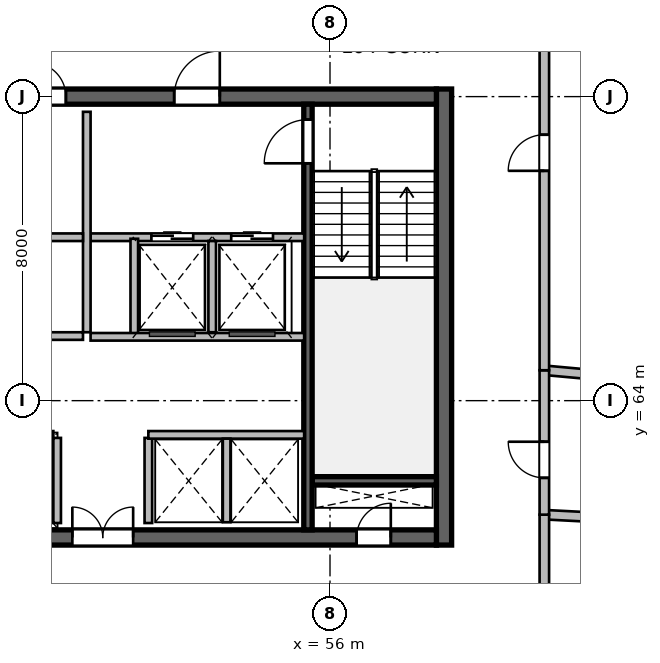
"""IFC4 building model, lengths in metres.
Left out: names, types, materials, properties, quantities, classifications, styles, units other than length and angle.
Written with IfcOpenShell. Run it as: python <this file> out.ifc"""

import sys

from ifc_helpers import new_model, si_unit, direction, frame, frame_2d, origin, place, context, subcontext, project, spatial, rectangle, extrude, source, transform, mapped, element, fill, save


model = new_model("IFC4")
c1 = context("Model", 3, precision=1e-05, world=origin(), true_north=direction((0.0, 1.0)))
c2 = subcontext(c1, "Body", "Model", "MODEL_VIEW")
j1 = project(units=[si_unit("LENGTHUNIT", "METRE"), si_unit("PLANEANGLEUNIT", "RADIAN")], contexts=[c1])
p1 = place(None, origin())
s1 = spatial("IfcSite", under=j1, at=p1, CompositionType="ELEMENT")
p2 = place(p1, origin())
s2 = spatial("IfcBuilding", under=s1, at=p2, CompositionType="ELEMENT")
p3 = place(p2, frame((0.0, 0.0, 264.0)))
s3 = spatial("IfcBuildingStorey", under=s2, at=p3, CompositionType="ELEMENT", Elevation=264.0)
m1 = source(origin(), c2, "Body", "SweptSolid", [
    extrude(rectangle(XDim=12.0, YDim=0.4, at=frame_2d((6.0, 0.0))), origin(), (0.0, 0.0, 1.0), 3.9),
])
p4 = place(p3, frame((59.0, 60.2, 0.0), z_axis=(0.0, 0.0, 1.0), x_axis=(0.0, 1.0, 0.0)))
e1 = element("IfcWall", 1, at=p4, inside=s3, PredefinedType="SHEAR", context=c2, shape_type="MappedRepresentation", body=[
    mapped(m1, transform((0.0, 0.0, 0.0), scale=1.0)),
])
m2 = source(origin(), c2, "Body", "SweptSolid", [
    extrude(rectangle(XDim=21.6, YDim=0.4, at=frame_2d((10.8, 0.0))), origin(), (0.0, 0.0, 1.0), 3.9),
])
p5 = place(p3, frame((37.2, 60.4, 0.0), z_axis=(0.0, 0.0, 1.0), x_axis=(1.0, 0.0, 0.0)))
e2 = element("IfcWall", 2, at=p5, inside=s3, PredefinedType="SHEAR", context=c2, shape_type="MappedRepresentation", body=[
    mapped(m2, transform((0.0, 0.0, 0.0), scale=1.0)),
])
p6 = place(p5, frame((1.1, 0.0, 0.0)))
e3 = element("IfcOpeningElement", 3, at=p6, cuts=e2, PredefinedType="OPENING", context=c2, shape_type="SweptSolid", body=[
    extrude(rectangle(XDim=1.15, YDim=2.15, at=frame_2d((0.575, 1.075))), frame((0.0, 0.21, 0.0), z_axis=(0.0, -1.0, 0.0), x_axis=(1.0, 0.0, 0.0)), (0.0, 0.0, 1.0), 0.42),
])
p7 = place(p5, frame((19.5, 0.0, 0.0)))
e4 = element("IfcOpeningElement", 4, at=p7, cuts=e2, PredefinedType="OPENING", context=c2, shape_type="SweptSolid", body=[
    extrude(rectangle(XDim=0.9, YDim=2.1, at=frame_2d((0.45, 1.05))), frame((0.0, 0.21, 0.0), z_axis=(0.0, -1.0, 0.0), x_axis=(1.0, 0.0, 0.0)), (0.0, 0.0, 1.0), 0.42),
])
p8 = place(p5, frame((12.02, 0.0, 0.0)))
e5 = element("IfcOpeningElement", 5, at=p8, cuts=e2, PredefinedType="OPENING", context=c2, shape_type="SweptSolid", body=[
    extrude(rectangle(XDim=1.6, YDim=2.15, at=frame_2d((0.8, 1.075))), frame((0.0, 0.21, 0.0), z_axis=(0.0, -1.0, 0.0), x_axis=(1.0, 0.0, 0.0)), (0.0, 0.0, 1.0), 0.42),
])
p9 = place(p3, frame((37.2, 72.0, 0.0), z_axis=(0.0, 0.0, 1.0), x_axis=(1.0, 0.0, 0.0)))
e6 = element("IfcWall", 6, at=p9, inside=s3, PredefinedType="SHEAR", context=c2, shape_type="MappedRepresentation", body=[
    mapped(m2, transform((0.0, 0.0, 0.0), scale=1.0)),
])
p10 = place(p9, frame((1.2, 0.0, 0.0)))
e7 = element("IfcOpeningElement", 7, at=p10, cuts=e6, PredefinedType="OPENING", context=c2, shape_type="SweptSolid", body=[
    extrude(rectangle(XDim=0.9, YDim=2.1, at=frame_2d((0.45, 1.05))), frame((0.0, 0.21, 0.0), z_axis=(0.0, -1.0, 0.0), x_axis=(1.0, 0.0, 0.0)), (0.0, 0.0, 1.0), 0.42),
])
p11 = place(p9, frame((14.7, 0.0, 0.0)))
e8 = element("IfcOpeningElement", 8, at=p11, cuts=e6, PredefinedType="OPENING", context=c2, shape_type="SweptSolid", body=[
    extrude(rectangle(XDim=1.2, YDim=2.15, at=frame_2d((0.6, 1.075))), frame((0.0, 0.21, 0.0), z_axis=(0.0, -1.0, 0.0), x_axis=(1.0, 0.0, 0.0)), (0.0, 0.0, 1.0), 0.42),
])
p12 = place(p9, frame((4.15, 0.0, 0.0)))
e9 = element("IfcOpeningElement", 9, at=p12, cuts=e6, PredefinedType="OPENING", context=c2, shape_type="SweptSolid", body=[
    extrude(rectangle(XDim=1.3, YDim=2.15, at=frame_2d((0.65, 1.075))), frame((0.0, 0.21, 0.0), z_axis=(0.0, -1.0, 0.0), x_axis=(1.0, 0.0, 0.0)), (0.0, 0.0, 1.0), 0.42),
])
p13 = place(p9, frame((7.25, 0.0, 0.0)))
e10 = element("IfcOpeningElement", 10, at=p13, cuts=e6, PredefinedType="OPENING", context=c2, shape_type="SweptSolid", body=[
    extrude(rectangle(XDim=0.9, YDim=2.1, at=frame_2d((0.45, 1.05))), frame((0.0, 0.21, 0.0), z_axis=(0.0, -1.0, 0.0), x_axis=(1.0, 0.0, 0.0)), (0.0, 0.0, 1.0), 0.42),
])
p14 = place(p9, frame((10.95, 0.0, 0.0)))
e11 = element("IfcOpeningElement", 11, at=p14, cuts=e6, PredefinedType="OPENING", context=c2, shape_type="SweptSolid", body=[
    extrude(rectangle(XDim=0.9, YDim=2.1, at=frame_2d((0.45, 1.05))), frame((0.0, 0.21, 0.0), z_axis=(0.0, -1.0, 0.0), x_axis=(1.0, 0.0, 0.0)), (0.0, 0.0, 1.0), 0.42),
])
m3 = source(origin(), c2, "Body", "SweptSolid", [
    extrude(rectangle(XDim=3.27, YDim=0.22, at=frame_2d((1.635, 0.0))), origin(), (0.0, 0.0, 1.0), 3.9),
])
p15 = place(p3, frame((55.53, 61.89, 0.0), z_axis=(0.0, 0.0, 1.0), x_axis=(1.0, 0.0, 0.0)))
e12 = element("IfcWall", 12, at=p15, inside=s3, PredefinedType="SHEAR", context=c2, shape_type="MappedRepresentation", body=[
    mapped(m3, transform((0.0, 0.0, 0.0), scale=1.0)),
])
m4 = source(origin(), c2, "Body", "SweptSolid", [
    extrude(rectangle(XDim=11.2, YDim=0.22, at=frame_2d((5.6, 0.0))), origin(), (0.0, 0.0, 1.0), 3.9),
])
p16 = place(p3, frame((55.42, 60.6, 0.0), z_axis=(0.0, 0.0, 1.0), x_axis=(0.0, 1.0, 0.0)))
e13 = element("IfcWall", 13, at=p16, inside=s3, PredefinedType="SHEAR", context=c2, shape_type="MappedRepresentation", body=[
    mapped(m4, transform((0.0, 0.0, 0.0), scale=1.0)),
])
p17 = place(p16, frame((9.645, 0.0, 0.0)))
e14 = element("IfcOpeningElement", 14, at=p17, cuts=e13, PredefinedType="OPENING", context=c2, shape_type="SweptSolid", body=[
    extrude(rectangle(XDim=1.15, YDim=2.15, at=frame_2d((0.575, 1.075))), frame((0.0, 0.12, 0.0), z_axis=(0.0, -1.0, 0.0), x_axis=(1.0, 0.0, 0.0)), (0.0, 0.0, 1.0), 0.24),
])
m5 = source(origin(), c2, "Body", "SweptSolid", [
    extrude(rectangle(XDim=2.24, YDim=0.2, at=frame_2d((1.12, 0.0))), origin(), (0.0, 0.0, 1.0), 3.65),
])
for number, where, z_axis, x_axis in (
    (15, (48.82, 60.78, 0.0), (0.0, 0.0, 1.0), (0.0, 1.0, 0.0)),
    (16, (51.22, 60.78, 0.0), (0.0, 0.0, 1.0), (0.0, 1.0, 0.0)),
):
    element("IfcWall", number, at=place(p3, frame(where, z_axis=z_axis, x_axis=x_axis)), inside=s3, PredefinedType="SOLIDWALL", context=c2, shape_type="MappedRepresentation", body=[
        mapped(m5, transform((0.0, 0.0, 0.0), scale=1.0)),
    ])
m6 = source(origin(), c2, "Body", "SweptSolid", [
    extrude(rectangle(XDim=5.62, YDim=0.2, at=frame_2d((2.81, 0.0))), origin(), (0.0, 0.0, 1.0), 3.65),
])
p18 = place(p3, frame((49.7, 68.3, 0.0), z_axis=(0.0, 0.0, 1.0), x_axis=(1.0, 0.0, 0.0)))
e17 = element("IfcWall", 17, at=p18, inside=s3, PredefinedType="SOLIDWALL", context=c2, shape_type="MappedRepresentation", body=[
    mapped(m6, transform((0.0, 0.0, 0.0), scale=1.0)),
])
p19 = place(p18, frame((1.6, 0.0, 0.0)))
e18 = element("IfcOpeningElement", 18, at=p19, cuts=e17, PredefinedType="OPENING", context=c2, shape_type="SweptSolid", body=[
    extrude(rectangle(XDim=1.1, YDim=2.15, at=frame_2d((0.55, 1.075))), frame((0.0, 0.11, 0.0), z_axis=(0.0, -1.0, 0.0), x_axis=(1.0, 0.0, 0.0)), (0.0, 0.0, 1.0), 0.22),
])
p20 = place(p18, frame((3.7, 0.0, 0.0)))
e19 = element("IfcOpeningElement", 19, at=p20, cuts=e17, PredefinedType="OPENING", context=c2, shape_type="SweptSolid", body=[
    extrude(rectangle(XDim=1.1, YDim=2.15, at=frame_2d((0.55, 1.075))), frame((0.0, 0.11, 0.0), z_axis=(0.0, -1.0, 0.0), x_axis=(1.0, 0.0, 0.0)), (0.0, 0.0, 1.0), 0.22),
])
m7 = source(origin(), c2, "Body", "SweptSolid", [
    extrude(rectangle(XDim=5.8, YDim=0.2, at=frame_2d((2.9, 0.0))), origin(), (0.0, 0.0, 1.0), 3.65),
])
p21 = place(p3, frame((49.6, 65.8, 0.0), z_axis=(0.0, 0.0, 1.0), x_axis=(0.0, 1.0, 0.0)))
e20 = element("IfcWall", 20, at=p21, inside=s3, PredefinedType="SOLIDWALL", context=c2, shape_type="MappedRepresentation", body=[
    mapped(m7, transform((0.0, 0.0, 0.0), scale=1.0)),
])
m8 = source(origin(), c2, "Body", "SweptSolid", [
    extrude(rectangle(XDim=2.58, YDim=0.2, at=frame_2d((1.29, 0.0))), origin(), (0.0, 0.0, 1.0), 3.65),
])
p22 = place(p3, frame((50.85, 65.68, 0.0), z_axis=(0.0, 0.0, 1.0), x_axis=(0.0, 1.0, 0.0)))
e21 = element("IfcWall", 21, at=p22, inside=s3, PredefinedType="SOLIDWALL", context=c2, shape_type="MappedRepresentation", body=[
    mapped(m8, transform((0.0, 0.0, 0.0), scale=1.0)),
])
m9 = source(origin(), c2, "Body", "SweptSolid", [
    extrude(rectangle(XDim=2.4, YDim=0.2, at=frame_2d((1.2, 0.0))), origin(), (0.0, 0.0, 1.0), 3.65),
])
p23 = place(p3, frame((52.9, 65.8, 0.0), z_axis=(0.0, 0.0, 1.0), x_axis=(0.0, 1.0, 0.0)))
e22 = element("IfcWall", 22, at=p23, inside=s3, PredefinedType="SOLIDWALL", context=c2, shape_type="MappedRepresentation", body=[
    mapped(m9, transform((0.0, 0.0, 0.0), scale=1.0)),
])
p24 = place(p3, frame((49.7, 65.68, 0.0), z_axis=(0.0, 0.0, 1.0), x_axis=(1.0, 0.0, 0.0)))
e23 = element("IfcWall", 23, at=p24, inside=s3, PredefinedType="SOLIDWALL", context=c2, shape_type="MappedRepresentation", body=[
    mapped(m6, transform((0.0, 0.0, 0.0), scale=1.0)),
])
m10 = source(origin(), c2, "Body", "SweptSolid", [
    extrude(rectangle(XDim=8.8, YDim=0.2, at=frame_2d((4.4, 0.0))), origin(), (0.0, 0.0, 1.0), 3.65),
])
p25 = place(p3, frame((40.7, 68.3, 0.0), z_axis=(0.0, 0.0, 1.0), x_axis=(1.0, 0.0, 0.0)))
e24 = element("IfcWall", 24, at=p25, inside=s3, PredefinedType="SOLIDWALL", context=c2, shape_type="MappedRepresentation", body=[
    mapped(m10, transform((0.0, 0.0, 0.0), scale=1.0)),
])
m11 = source(origin(), c2, "Body", "SweptSolid", [
    extrude(rectangle(XDim=8.02, YDim=0.2, at=frame_2d((4.01, 0.0))), origin(), (0.0, 0.0, 1.0), 3.65),
])
p26 = place(p3, frame((40.7, 63.1, 0.0), z_axis=(0.0, 0.0, 1.0), x_axis=(1.0, 0.0, 0.0)))
e25 = element("IfcWall", 25, at=p26, inside=s3, PredefinedType="SOLIDWALL", context=c2, shape_type="MappedRepresentation", body=[
    mapped(m11, transform((0.0, 0.0, 0.0), scale=1.0)),
])
p27 = place(p26, frame((0.72, 0.0, 0.0)))
e26 = element("IfcOpeningElement", 26, at=p27, cuts=e25, PredefinedType="OPENING", context=c2, shape_type="SweptSolid", body=[
    extrude(rectangle(XDim=1.0, YDim=2.15, at=frame_2d((0.5, 1.075))), frame((0.0, 0.11, 0.0), z_axis=(0.0, -1.0, 0.0), x_axis=(1.0, 0.0, 0.0)), (0.0, 0.0, 1.0), 0.22),
])
p28 = place(p26, frame((2.62, 0.0, 0.0)))
e27 = element("IfcOpeningElement", 27, at=p28, cuts=e25, PredefinedType="OPENING", context=c2, shape_type="SweptSolid", body=[
    extrude(rectangle(XDim=1.0, YDim=2.15, at=frame_2d((0.5, 1.075))), frame((0.0, 0.11, 0.0), z_axis=(0.0, -1.0, 0.0), x_axis=(1.0, 0.0, 0.0)), (0.0, 0.0, 1.0), 0.22),
])
p29 = place(p26, frame((4.55, 0.0, 0.0)))
e28 = element("IfcOpeningElement", 28, at=p29, cuts=e25, PredefinedType="OPENING", context=c2, shape_type="SweptSolid", body=[
    extrude(rectangle(XDim=1.0, YDim=2.15, at=frame_2d((0.5, 1.075))), frame((0.0, 0.11, 0.0), z_axis=(0.0, -1.0, 0.0), x_axis=(1.0, 0.0, 0.0)), (0.0, 0.0, 1.0), 0.22),
])
p30 = place(p26, frame((6.55, 0.0, 0.0)))
e29 = element("IfcOpeningElement", 29, at=p30, cuts=e25, PredefinedType="OPENING", context=c2, shape_type="SweptSolid", body=[
    extrude(rectangle(XDim=1.0, YDim=2.15, at=frame_2d((0.5, 1.075))), frame((0.0, 0.11, 0.0), z_axis=(0.0, -1.0, 0.0), x_axis=(1.0, 0.0, 0.0)), (0.0, 0.0, 1.0), 0.22),
])
m12 = source(origin(), c2, "Body", "SweptSolid", [
    extrude(rectangle(XDim=4.1, YDim=0.2, at=frame_2d((2.05, 0.0))), origin(), (0.0, 0.0, 1.0), 3.65),
])
p31 = place(p3, frame((51.22, 63.1, 0.0), z_axis=(0.0, 0.0, 1.0), x_axis=(1.0, 0.0, 0.0)))
e30 = element("IfcWall", 30, at=p31, inside=s3, PredefinedType="SOLIDWALL", context=c2, shape_type="MappedRepresentation", body=[
    mapped(m12, transform((0.0, 0.0, 0.0), scale=1.0)),
])
m13 = source(origin(), c2, "Body", "SweptSolid", [
    extrude(rectangle(XDim=2.2, YDim=0.2, at=frame_2d((1.1, 0.0))), origin(), (0.0, 0.0, 1.0), 3.65),
])
p32 = place(p3, frame((53.28, 60.8, 0.0), z_axis=(0.0, 0.0, 1.0), x_axis=(0.0, 1.0, 0.0)))
e31 = element("IfcWall", 31, at=p32, inside=s3, PredefinedType="SOLIDWALL", context=c2, shape_type="MappedRepresentation", body=[
    mapped(m13, transform((0.0, 0.0, 0.0), scale=1.0)),
])
p33 = place(p3, frame((40.7, 65.7, 0.0), z_axis=(0.0, 0.0, 1.0), x_axis=(1.0, 0.0, 0.0)))
e32 = element("IfcWall", 32, at=p33, inside=s3, PredefinedType="SOLIDWALL", context=c2, shape_type="MappedRepresentation", body=[
    mapped(m10, transform((0.0, 0.0, 0.0), scale=1.0)),
])
p34 = place(p33, frame((1.6, 0.0, 0.0)))
e33 = element("IfcOpeningElement", 33, at=p34, cuts=e32, PredefinedType="OPENING", context=c2, shape_type="SweptSolid", body=[
    extrude(rectangle(XDim=0.9, YDim=2.1, at=frame_2d((0.45, 1.05))), frame((0.0, 0.11, 0.0), z_axis=(0.0, -1.0, 0.0), x_axis=(1.0, 0.0, 0.0)), (0.0, 0.0, 1.0), 0.22),
])
p35 = place(p33, frame((6.1, 0.0, 0.0)))
e34 = element("IfcOpeningElement", 34, at=p35, cuts=e32, PredefinedType="OPENING", context=c2, shape_type="SweptSolid", body=[
    extrude(rectangle(XDim=0.9, YDim=2.1, at=frame_2d((0.45, 1.05))), frame((0.0, 0.11, 0.0), z_axis=(0.0, -1.0, 0.0), x_axis=(1.0, 0.0, 0.0)), (0.0, 0.0, 1.0), 0.22),
])
m14 = source(origin(), c2, "Body", "SweptSolid", [
    extrude(rectangle(XDim=12.938, YDim=0.25, at=frame_2d((6.469, 0.0))), origin(), (0.0, 0.0, 1.0), 3.65),
])
p36 = place(p3, frame((61.64, 61.0, 0.0), z_axis=(0.0, 0.0, 1.0), x_axis=(0.998643821866, -0.052062626215, 0.0)))
e35 = element("IfcWall", 35, at=p36, inside=s3, PredefinedType="PARTITIONING", context=c2, shape_type="MappedRepresentation", body=[
    mapped(m14, transform((0.0, 0.0, 0.0), scale=1.0)),
])
m15 = source(origin(), c2, "Body", "SweptSolid", [
    extrude(rectangle(XDim=3.04, YDim=0.25, at=frame_2d((1.52, 0.0))), origin(), (0.0, 0.0, 1.0), 3.65),
])
p37 = place(p3, frame((61.64, 57.96, 0.0), z_axis=(0.0, 0.0, 1.0), x_axis=(0.0, 1.0, 0.0)))
e36 = element("IfcWall", 36, at=p37, inside=s3, PredefinedType="PARTITIONING", context=c2, shape_type="MappedRepresentation", body=[
    mapped(m15, transform((0.0, 0.0, 0.0), scale=1.0)),
])
m16 = source(origin(), c2, "Body", "SweptSolid", [
    extrude(rectangle(XDim=13.228, YDim=0.25, at=frame_2d((6.614, 0.0))), origin(), (0.0, 0.0, 1.0), 3.65),
])
p38 = place(p3, frame((61.64, 64.8, 0.0), z_axis=(0.0, 0.0, 1.0), x_axis=(0.995868510157, -0.090806995755, 0.0)))
e37 = element("IfcWall", 37, at=p38, inside=s3, PredefinedType="PARTITIONING", context=c2, shape_type="MappedRepresentation", body=[
    mapped(m16, transform((0.0, 0.0, 0.0), scale=1.0)),
])
m17 = source(origin(), c2, "Body", "SweptSolid", [
    extrude(rectangle(XDim=3.8, YDim=0.25, at=frame_2d((1.9, 0.0))), origin(), (0.0, 0.0, 1.0), 3.65),
])
p39 = place(p3, frame((61.64, 61.0, 0.0), z_axis=(0.0, 0.0, 1.0), x_axis=(0.0, 1.0, 0.0)))
e38 = element("IfcWall", 38, at=p39, inside=s3, PredefinedType="PARTITIONING", context=c2, shape_type="MappedRepresentation", body=[
    mapped(m17, transform((0.0, 0.0, 0.0), scale=1.0)),
])
p40 = place(p39, frame((0.969, 0.0, 0.0)))
e39 = element("IfcOpeningElement", 39, at=p40, cuts=e38, PredefinedType="OPENING", context=c2, shape_type="SweptSolid", body=[
    extrude(rectangle(XDim=0.95, YDim=2.1, at=frame_2d((0.475, 1.05))), frame((0.0, 0.135, 0.0), z_axis=(0.0, -1.0, 0.0), x_axis=(1.0, 0.0, 0.0)), (0.0, 0.0, 1.0), 0.27),
])
m18 = source(origin(), c2, "Body", "SweptSolid", [
    extrude(rectangle(XDim=11.445, YDim=0.25, at=frame_2d((5.722, 0.0))), origin(), (0.0, 0.0, 1.0), 3.65),
])
p41 = place(p3, frame((61.64, 64.8, 0.0), z_axis=(0.0, 0.0, 1.0), x_axis=(0.0, 1.0, 0.0)))
e40 = element("IfcWall", 40, at=p41, inside=s3, PredefinedType="PARTITIONING", context=c2, shape_type="MappedRepresentation", body=[
    mapped(m18, transform((0.0, 0.0, 0.0), scale=1.0)),
])
p42 = place(p41, frame((5.247, 0.0, 0.0)))
e41 = element("IfcOpeningElement", 41, at=p42, cuts=e40, PredefinedType="OPENING", context=c2, shape_type="SweptSolid", body=[
    extrude(rectangle(XDim=0.95, YDim=2.1, at=frame_2d((0.475, 1.05))), frame((0.0, 0.135, 0.0), z_axis=(0.0, -1.0, 0.0), x_axis=(1.0, 0.0, 0.0)), (0.0, 0.0, 1.0), 0.27),
])
m19 = source(origin(), c2, "Body", "SweptSolid", [
    extrude(rectangle(XDim=0.9, YDim=2.1, at=frame_2d((0.45, 1.05))), frame((0.0, 0.025, 0.0), z_axis=(0.0, -1.0, 0.0), x_axis=(1.0, 0.0, 0.0)), (0.0, 0.0, 1.0), 0.05),
])
p43 = place(p7, origin())
e42 = element("IfcDoor", 42, at=p43, inside=s3, OperationType="SINGLE_SWING_RIGHT", PredefinedType="DOOR", context=c2, shape_type="MappedRepresentation", body=[
    mapped(m19, transform((0.0, 0.0, 0.0), scale=1.0)),
])
fill(e4, e42)
m20 = source(origin(), c2, "Body", "SweptSolid", [
    extrude(rectangle(XDim=1.15, YDim=2.15, at=frame_2d((0.575, 1.075))), frame((0.0, 0.025, 0.0), z_axis=(0.0, -1.0, 0.0), x_axis=(1.0, 0.0, 0.0)), (0.0, 0.0, 1.0), 0.05),
])
p44 = place(p17, origin())
e43 = element("IfcDoor", 43, at=p44, inside=s3, OperationType="SINGLE_SWING_LEFT", PredefinedType="DOOR", context=c2, shape_type="MappedRepresentation", body=[
    mapped(m20, transform((0.0, 0.0, 0.0), scale=1.0)),
])
fill(e14, e43)
m21 = source(origin(), c2, "Body", "SweptSolid", [
    extrude(rectangle(XDim=1.6, YDim=2.15, at=frame_2d((0.8, 1.075))), frame((0.0, 0.025, 0.0), z_axis=(0.0, -1.0, 0.0), x_axis=(1.0, 0.0, 0.0)), (0.0, 0.0, 1.0), 0.05),
])
p45 = place(p8, origin())
e44 = element("IfcDoor", 44, at=p45, inside=s3, OperationType="DOUBLE_DOOR_SINGLE_SWING", PredefinedType="DOOR", context=c2, shape_type="MappedRepresentation", body=[
    mapped(m21, transform((0.0, 0.0, 0.0), scale=1.0)),
])
fill(e5, e44)
m22 = source(origin(), c2, "Body", "SweptSolid", [
    extrude(rectangle(XDim=1.2, YDim=2.15, at=frame_2d((0.6, 1.075))), frame((0.0, 0.025, 0.0), z_axis=(0.0, -1.0, 0.0), x_axis=(1.0, 0.0, 0.0)), (0.0, 0.0, 1.0), 0.05),
])
p46 = place(p11, origin())
e45 = element("IfcDoor", 45, at=p46, inside=s3, OperationType="SINGLE_SWING_RIGHT", PredefinedType="DOOR", context=c2, shape_type="MappedRepresentation", body=[
    mapped(m22, transform((0.0, 0.0, 0.0), scale=1.0)),
])
fill(e8, e45)
m23 = source(origin(), c2, "Body", "SweptSolid", [
    extrude(rectangle(XDim=1.1, YDim=2.15, at=frame_2d((0.55, 1.075))), frame((0.0, 0.025, 0.0), z_axis=(0.0, -1.0, 0.0), x_axis=(1.0, 0.0, 0.0)), (0.0, 0.0, 1.0), 0.05),
])
p47 = place(p19, origin())
e46 = element("IfcDoor", 46, at=p47, inside=s3, OperationType="DOUBLE_DOOR_SLIDING", PredefinedType="DOOR", context=c2, shape_type="MappedRepresentation", body=[
    mapped(m23, transform((0.0, 0.0, 0.0), scale=1.0)),
])
fill(e18, e46)
p48 = place(p20, origin())
e47 = element("IfcDoor", 47, at=p48, inside=s3, OperationType="DOUBLE_DOOR_SLIDING", PredefinedType="DOOR", context=c2, shape_type="MappedRepresentation", body=[
    mapped(m23, transform((0.0, 0.0, 0.0), scale=1.0)),
])
fill(e19, e47)
p49 = place(p14, origin())
e48 = element("IfcDoor", 48, at=p49, inside=s3, OperationType="SINGLE_SWING_LEFT", PredefinedType="DOOR", context=c2, shape_type="MappedRepresentation", body=[
    mapped(m19, transform((0.0, 0.0, 0.0), scale=1.0)),
])
fill(e11, e48)
m24 = source(origin(), c2, "Body", "SweptSolid", [
    extrude(rectangle(XDim=0.95, YDim=2.1, at=frame_2d((0.475, 1.05))), frame((0.0, 0.025, 0.0), z_axis=(0.0, -1.0, 0.0), x_axis=(1.0, 0.0, 0.0)), (0.0, 0.0, 1.0), 0.05),
])
p50 = place(p40, origin())
e49 = element("IfcDoor", 49, at=p50, inside=s3, OperationType="SINGLE_SWING_RIGHT", PredefinedType="DOOR", context=c2, shape_type="MappedRepresentation", body=[
    mapped(m24, transform((0.0, 0.0, 0.0), scale=1.0)),
])
fill(e39, e49)
p51 = place(p42, origin())
e50 = element("IfcDoor", 50, at=p51, inside=s3, OperationType="SINGLE_SWING_LEFT", PredefinedType="DOOR", context=c2, shape_type="MappedRepresentation", body=[
    mapped(m24, transform((0.0, 0.0, 0.0), scale=1.0)),
])
fill(e41, e50)
save(model, sys.argv[1])
